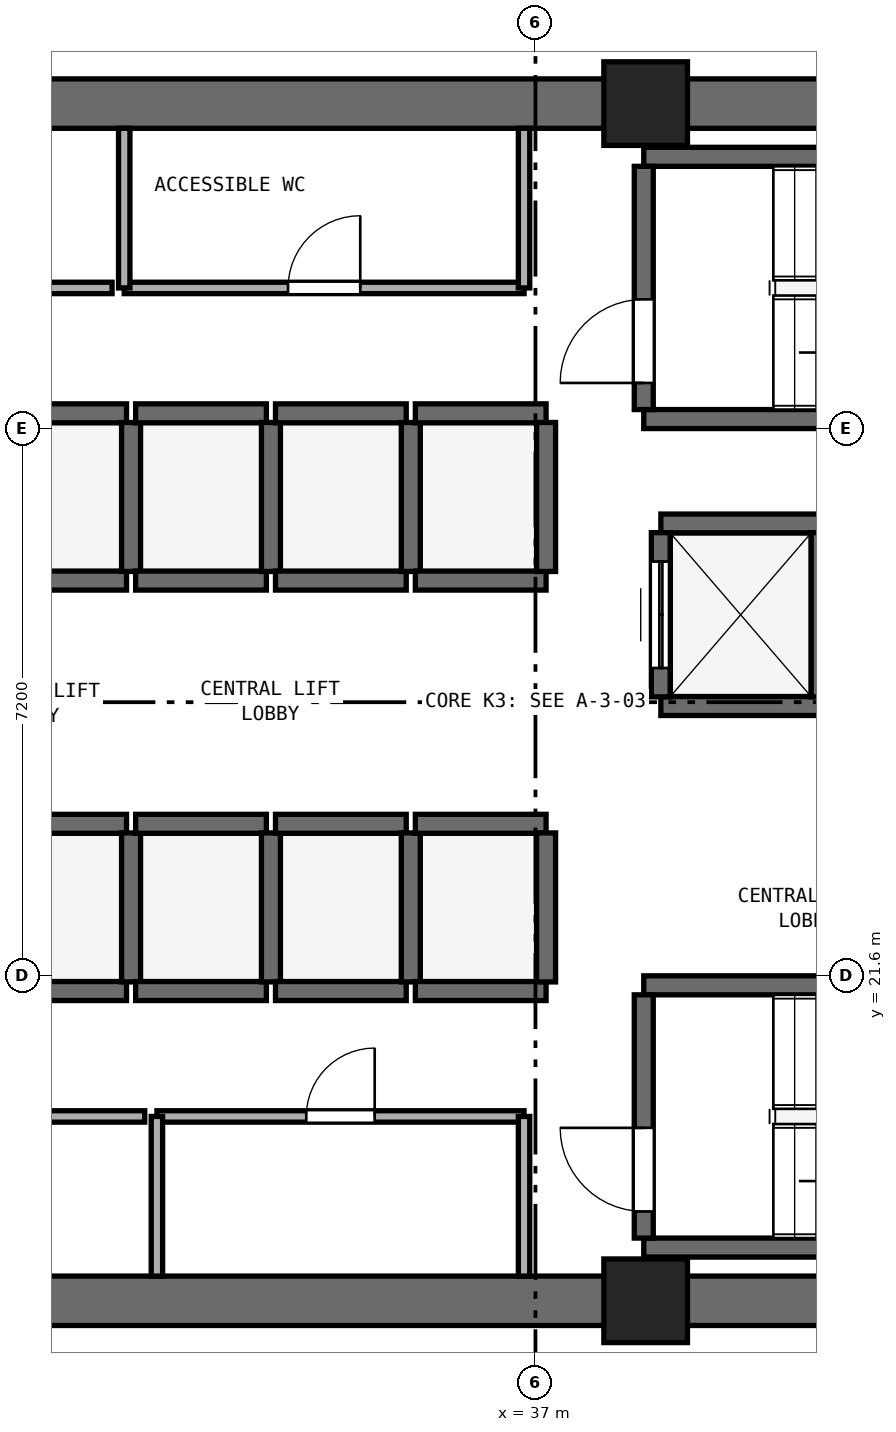
"""IFC4 building model, lengths in metres.
Left out: names, types, materials, properties, quantities, classifications, styles, units other than length and angle.
Written with IfcOpenShell. Run it as: python <this file> out.ifc"""

import sys

from ifc_helpers import new_model, si_unit, direction, frame, frame_2d, origin, origin_2d, place, context, subcontext, project, spatial, rectangle, extrude, element, fill, save


model = new_model("IFC4")
c1 = context("Model", 3, precision=1e-05, world=origin(), true_north=direction((0.0, 1.0)))
c2 = subcontext(c1, "Body", "Model", "MODEL_VIEW")
j1 = project(units=[si_unit("LENGTHUNIT", "METRE"), si_unit("PLANEANGLEUNIT", "RADIAN")], contexts=[c1])
p1 = place(None, origin())
s1 = spatial("IfcSite", under=j1, at=p1, CompositionType="ELEMENT")
p2 = place(p1, origin())
s2 = spatial("IfcBuilding", under=s1, at=p2, CompositionType="ELEMENT")
p3 = place(p2, frame((0.0, 0.0, 44.0)))
s3 = spatial("IfcBuildingStorey", under=s2, at=p3, CompositionType="ELEMENT", Elevation=44.0)
for number, where, z_axis, x_axis in (
    (1, (25.4, 17.325, 0.0), (0.0, 0.0, 1.0), (1.0, 0.0, 0.0)),
    (2, (25.4, 33.075, 0.0), (0.0, 0.0, 1.0), (1.0, 0.0, 0.0)),
):
    element("IfcWall", number, at=place(p3, frame(where, z_axis=z_axis, x_axis=x_axis)), inside=s3, PredefinedType="SHEAR", context=c2, shape_type="SweptSolid", body=[
        extrude(rectangle(XDim=23.2, YDim=0.65, at=frame_2d((11.6, 0.0))), origin(), (0.0, 0.0, 1.0), 3.525),
    ])
for number, where, z_axis, x_axis in (
    (3, (38.45, 17.325, 0.0), (0.0, 0.0, 1.0), (1.0, 0.0, 0.0)),
    (4, (38.45, 33.075, 0.0), (0.0, 0.0, 1.0), (1.0, 0.0, 0.0)),
):
    element("IfcColumn", number, at=place(p3, frame(where, z_axis=z_axis, x_axis=x_axis)), inside=s3, PredefinedType="PILASTER", context=c2, shape_type="SweptSolid", body=[
        extrude(rectangle(XDim=1.1, YDim=1.1, at=origin_2d()), origin(), (0.0, 0.0, 1.0), 3.8),
    ])
for number, where, z_axis, x_axis in (
    (5, (38.425, 28.925, 0.0), (0.0, 0.0, 1.0), (1.0, 0.0, 0.0)),
    (6, (38.425, 32.375, 0.0), (0.0, 0.0, 1.0), (1.0, 0.0, 0.0)),
):
    element("IfcWall", number, at=place(p3, frame(where, z_axis=z_axis, x_axis=x_axis)), inside=s3, PredefinedType="SHEAR", context=c2, shape_type="SweptSolid", body=[
        extrude(rectangle(XDim=7.3, YDim=0.25, at=frame_2d((3.65, 0.0))), origin(), (0.0, 0.0, 1.0), 3.525),
    ])
p4 = place(p3, frame((38.425, 29.05, 0.0), z_axis=(0.0, 0.0, 1.0), x_axis=(0.0, 1.0, 0.0)))
e7 = element("IfcWall", 7, at=p4, inside=s3, PredefinedType="SHEAR", context=c2, shape_type="SweptSolid", body=[
    extrude(rectangle(XDim=3.2, YDim=0.25, at=frame_2d((1.6, 0.0))), origin(), (0.0, 0.0, 1.0), 3.525),
])
p5 = place(p4, frame((0.35, 0.0, 0.0)))
e8 = element("IfcOpeningElement", 8, at=p5, cuts=e7, PredefinedType="OPENING", context=c2, shape_type="SweptSolid", body=[
    extrude(rectangle(XDim=1.1, YDim=2.15, at=frame_2d((0.55, 1.075))), frame((0.0, 0.135, 0.0), z_axis=(0.0, -1.0, 0.0), x_axis=(1.0, 0.0, 0.0)), (0.0, 0.0, 1.0), 0.27),
])
for number, where, z_axis, x_axis in (
    (9, (38.425, 18.025, 0.0), (0.0, 0.0, 1.0), (1.0, 0.0, 0.0)),
    (10, (38.425, 21.475, 0.0), (0.0, 0.0, 1.0), (1.0, 0.0, 0.0)),
):
    element("IfcWall", number, at=place(p3, frame(where, z_axis=z_axis, x_axis=x_axis)), inside=s3, PredefinedType="SHEAR", context=c2, shape_type="SweptSolid", body=[
        extrude(rectangle(XDim=7.3, YDim=0.25, at=frame_2d((3.65, 0.0))), origin(), (0.0, 0.0, 1.0), 3.525),
    ])
p6 = place(p3, frame((38.425, 18.15, 0.0), z_axis=(0.0, 0.0, 1.0), x_axis=(0.0, 1.0, 0.0)))
e11 = element("IfcWall", 11, at=p6, inside=s3, PredefinedType="SHEAR", context=c2, shape_type="SweptSolid", body=[
    extrude(rectangle(XDim=3.2, YDim=0.25, at=frame_2d((1.6, 0.0))), origin(), (0.0, 0.0, 1.0), 3.525),
])
p7 = place(p6, frame((0.35, 0.0, 0.0)))
e12 = element("IfcOpeningElement", 12, at=p7, cuts=e11, PredefinedType="OPENING", context=c2, shape_type="SweptSolid", body=[
    extrude(rectangle(XDim=1.1, YDim=2.15, at=frame_2d((0.55, 1.075))), frame((0.0, 0.135, 0.0), z_axis=(0.0, -1.0, 0.0), x_axis=(1.0, 0.0, 0.0)), (0.0, 0.0, 1.0), 0.27),
])
for number, where, z_axis, x_axis in (
    (13, (29.9, 21.4, 0.0), (0.0, 0.0, 1.0), (1.0, 0.0, 0.0)),
    (14, (29.9, 23.6, 0.0), (0.0, 0.0, 1.0), (1.0, 0.0, 0.0)),
):
    element("IfcWall", number, at=place(p3, frame(where, z_axis=z_axis, x_axis=x_axis)), inside=s3, PredefinedType="SHEAR", context=c2, shape_type="SweptSolid", body=[
        extrude(rectangle(XDim=1.72, YDim=0.25, at=frame_2d((0.86, 0.0))), origin(), (0.0, 0.0, 1.0), 3.525),
    ])
p8 = place(p3, frame((31.68, 21.52, 0.0), z_axis=(0.0, 0.0, 1.0), x_axis=(0.0, 1.0, 0.0)))
e15 = element("IfcWall", 15, at=p8, inside=s3, PredefinedType="SHEAR", context=c2, shape_type="SweptSolid", body=[
    extrude(rectangle(XDim=1.96, YDim=0.25, at=frame_2d((0.98, 0.0))), origin(), (0.0, 0.0, 1.0), 3.525),
])
for number, where, z_axis, x_axis in (
    (16, (31.74, 21.4, 0.0), (0.0, 0.0, 1.0), (1.0, 0.0, 0.0)),
    (17, (31.74, 23.6, 0.0), (0.0, 0.0, 1.0), (1.0, 0.0, 0.0)),
):
    element("IfcWall", number, at=place(p3, frame(where, z_axis=z_axis, x_axis=x_axis)), inside=s3, PredefinedType="SHEAR", context=c2, shape_type="SweptSolid", body=[
        extrude(rectangle(XDim=1.72, YDim=0.25, at=frame_2d((0.86, 0.0))), origin(), (0.0, 0.0, 1.0), 3.525),
    ])
p9 = place(p3, frame((33.52, 21.52, 0.0), z_axis=(0.0, 0.0, 1.0), x_axis=(0.0, 1.0, 0.0)))
e18 = element("IfcWall", 18, at=p9, inside=s3, PredefinedType="SHEAR", context=c2, shape_type="SweptSolid", body=[
    extrude(rectangle(XDim=1.96, YDim=0.25, at=frame_2d((0.98, 0.0))), origin(), (0.0, 0.0, 1.0), 3.525),
])
for number, where, z_axis, x_axis in (
    (19, (33.58, 21.4, 0.0), (0.0, 0.0, 1.0), (1.0, 0.0, 0.0)),
    (20, (33.58, 23.6, 0.0), (0.0, 0.0, 1.0), (1.0, 0.0, 0.0)),
):
    element("IfcWall", number, at=place(p3, frame(where, z_axis=z_axis, x_axis=x_axis)), inside=s3, PredefinedType="SHEAR", context=c2, shape_type="SweptSolid", body=[
        extrude(rectangle(XDim=1.72, YDim=0.25, at=frame_2d((0.86, 0.0))), origin(), (0.0, 0.0, 1.0), 3.525),
    ])
p10 = place(p3, frame((35.36, 21.52, 0.0), z_axis=(0.0, 0.0, 1.0), x_axis=(0.0, 1.0, 0.0)))
e21 = element("IfcWall", 21, at=p10, inside=s3, PredefinedType="SHEAR", context=c2, shape_type="SweptSolid", body=[
    extrude(rectangle(XDim=1.96, YDim=0.25, at=frame_2d((0.98, 0.0))), origin(), (0.0, 0.0, 1.0), 3.525),
])
for number, where, z_axis, x_axis in (
    (22, (35.42, 21.4, 0.0), (0.0, 0.0, 1.0), (1.0, 0.0, 0.0)),
    (23, (35.42, 23.6, 0.0), (0.0, 0.0, 1.0), (1.0, 0.0, 0.0)),
):
    element("IfcWall", number, at=place(p3, frame(where, z_axis=z_axis, x_axis=x_axis)), inside=s3, PredefinedType="SHEAR", context=c2, shape_type="SweptSolid", body=[
        extrude(rectangle(XDim=1.72, YDim=0.25, at=frame_2d((0.86, 0.0))), origin(), (0.0, 0.0, 1.0), 3.525),
    ])
p11 = place(p3, frame((37.14, 21.52, 0.0), z_axis=(0.0, 0.0, 1.0), x_axis=(0.0, 1.0, 0.0)))
e24 = element("IfcWall", 24, at=p11, inside=s3, PredefinedType="SHEAR", context=c2, shape_type="SweptSolid", body=[
    extrude(rectangle(XDim=1.96, YDim=0.25, at=frame_2d((0.98, 0.0))), origin(), (0.0, 0.0, 1.0), 3.525),
])
for number, where, z_axis, x_axis in (
    (25, (29.9, 26.8, 0.0), (0.0, 0.0, 1.0), (1.0, 0.0, 0.0)),
    (26, (29.9, 29.0, 0.0), (0.0, 0.0, 1.0), (1.0, 0.0, 0.0)),
):
    element("IfcWall", number, at=place(p3, frame(where, z_axis=z_axis, x_axis=x_axis)), inside=s3, PredefinedType="SHEAR", context=c2, shape_type="SweptSolid", body=[
        extrude(rectangle(XDim=1.72, YDim=0.25, at=frame_2d((0.86, 0.0))), origin(), (0.0, 0.0, 1.0), 3.525),
    ])
p12 = place(p3, frame((31.68, 26.92, 0.0), z_axis=(0.0, 0.0, 1.0), x_axis=(0.0, 1.0, 0.0)))
e27 = element("IfcWall", 27, at=p12, inside=s3, PredefinedType="SHEAR", context=c2, shape_type="SweptSolid", body=[
    extrude(rectangle(XDim=1.96, YDim=0.25, at=frame_2d((0.98, 0.0))), origin(), (0.0, 0.0, 1.0), 3.525),
])
for number, where, z_axis, x_axis in (
    (28, (31.74, 26.8, 0.0), (0.0, 0.0, 1.0), (1.0, 0.0, 0.0)),
    (29, (31.74, 29.0, 0.0), (0.0, 0.0, 1.0), (1.0, 0.0, 0.0)),
):
    element("IfcWall", number, at=place(p3, frame(where, z_axis=z_axis, x_axis=x_axis)), inside=s3, PredefinedType="SHEAR", context=c2, shape_type="SweptSolid", body=[
        extrude(rectangle(XDim=1.72, YDim=0.25, at=frame_2d((0.86, 0.0))), origin(), (0.0, 0.0, 1.0), 3.525),
    ])
p13 = place(p3, frame((33.52, 26.92, 0.0), z_axis=(0.0, 0.0, 1.0), x_axis=(0.0, 1.0, 0.0)))
e30 = element("IfcWall", 30, at=p13, inside=s3, PredefinedType="SHEAR", context=c2, shape_type="SweptSolid", body=[
    extrude(rectangle(XDim=1.96, YDim=0.25, at=frame_2d((0.98, 0.0))), origin(), (0.0, 0.0, 1.0), 3.525),
])
for number, where, z_axis, x_axis in (
    (31, (33.58, 26.8, 0.0), (0.0, 0.0, 1.0), (1.0, 0.0, 0.0)),
    (32, (33.58, 29.0, 0.0), (0.0, 0.0, 1.0), (1.0, 0.0, 0.0)),
):
    element("IfcWall", number, at=place(p3, frame(where, z_axis=z_axis, x_axis=x_axis)), inside=s3, PredefinedType="SHEAR", context=c2, shape_type="SweptSolid", body=[
        extrude(rectangle(XDim=1.72, YDim=0.25, at=frame_2d((0.86, 0.0))), origin(), (0.0, 0.0, 1.0), 3.525),
    ])
p14 = place(p3, frame((35.36, 26.92, 0.0), z_axis=(0.0, 0.0, 1.0), x_axis=(0.0, 1.0, 0.0)))
e33 = element("IfcWall", 33, at=p14, inside=s3, PredefinedType="SHEAR", context=c2, shape_type="SweptSolid", body=[
    extrude(rectangle(XDim=1.96, YDim=0.25, at=frame_2d((0.98, 0.0))), origin(), (0.0, 0.0, 1.0), 3.525),
])
for number, where, z_axis, x_axis in (
    (34, (35.42, 26.8, 0.0), (0.0, 0.0, 1.0), (1.0, 0.0, 0.0)),
    (35, (35.42, 29.0, 0.0), (0.0, 0.0, 1.0), (1.0, 0.0, 0.0)),
):
    element("IfcWall", number, at=place(p3, frame(where, z_axis=z_axis, x_axis=x_axis)), inside=s3, PredefinedType="SHEAR", context=c2, shape_type="SweptSolid", body=[
        extrude(rectangle(XDim=1.72, YDim=0.25, at=frame_2d((0.86, 0.0))), origin(), (0.0, 0.0, 1.0), 3.525),
    ])
p15 = place(p3, frame((37.14, 26.92, 0.0), z_axis=(0.0, 0.0, 1.0), x_axis=(0.0, 1.0, 0.0)))
e36 = element("IfcWall", 36, at=p15, inside=s3, PredefinedType="SHEAR", context=c2, shape_type="SweptSolid", body=[
    extrude(rectangle(XDim=1.96, YDim=0.25, at=frame_2d((0.98, 0.0))), origin(), (0.0, 0.0, 1.0), 3.525),
])
for number, where, z_axis, x_axis in (
    (37, (38.65, 25.15, 0.0), (0.0, 0.0, 1.0), (1.0, 0.0, 0.0)),
    (38, (38.65, 27.55, 0.0), (0.0, 0.0, 1.0), (1.0, 0.0, 0.0)),
):
    element("IfcWall", number, at=place(p3, frame(where, z_axis=z_axis, x_axis=x_axis)), inside=s3, PredefinedType="SHEAR", context=c2, shape_type="SweptSolid", body=[
        extrude(rectangle(XDim=2.1, YDim=0.25, at=frame_2d((1.05, 0.0))), origin(), (0.0, 0.0, 1.0), 3.525),
    ])
p16 = place(p3, frame((38.65, 25.27, 0.0), z_axis=(0.0, 0.0, 1.0), x_axis=(0.0, 1.0, 0.0)))
e39 = element("IfcWall", 39, at=p16, inside=s3, PredefinedType="SHEAR", context=c2, shape_type="SweptSolid", body=[
    extrude(rectangle(XDim=2.16, YDim=0.25, at=frame_2d((1.08, 0.0))), origin(), (0.0, 0.0, 1.0), 3.525),
])
p17 = place(p16, frame((0.38, 0.0, 0.0)))
e40 = element("IfcOpeningElement", 40, at=p17, cuts=e39, PredefinedType="OPENING", context=c2, shape_type="SweptSolid", body=[
    extrude(rectangle(XDim=1.4, YDim=2.2, at=frame_2d((0.7, 1.1))), frame((0.0, 0.135, 0.0), z_axis=(0.0, -1.0, 0.0), x_axis=(1.0, 0.0, 0.0)), (0.0, 0.0, 1.0), 0.27),
])
p18 = place(p3, frame((40.75, 25.27, 0.0), z_axis=(0.0, 0.0, 1.0), x_axis=(0.0, 1.0, 0.0)))
e41 = element("IfcWall", 41, at=p18, inside=s3, PredefinedType="SHEAR", context=c2, shape_type="SweptSolid", body=[
    extrude(rectangle(XDim=2.16, YDim=0.25, at=frame_2d((1.08, 0.0))), origin(), (0.0, 0.0, 1.0), 3.525),
])
p19 = place(p3, frame((26.17, 30.65, 0.0), z_axis=(0.0, 0.0, 1.0), x_axis=(1.0, 0.0, 0.0)))
e42 = element("IfcWall", 42, at=p19, inside=s3, PredefinedType="PARTITIONING", context=c2, shape_type="SweptSolid", body=[
    extrude(rectangle(XDim=5.26, YDim=0.15, at=frame_2d((2.63, 0.0))), origin(), (0.0, 0.0, 1.0), 3.525),
])
p20 = place(p19, frame((2.155, 0.0, 0.0)))
e43 = element("IfcOpeningElement", 43, at=p20, cuts=e42, PredefinedType="OPENING", context=c2, shape_type="SweptSolid", body=[
    extrude(rectangle(XDim=0.95, YDim=2.1, at=frame_2d((0.475, 1.05))), frame((0.0, 0.085, 0.0), z_axis=(0.0, -1.0, 0.0), x_axis=(1.0, 0.0, 0.0)), (0.0, 0.0, 1.0), 0.17),
])
p21 = place(p3, frame((31.59, 30.65, 0.0), z_axis=(0.0, 0.0, 1.0), x_axis=(1.0, 0.0, 0.0)))
e44 = element("IfcWall", 44, at=p21, inside=s3, PredefinedType="PARTITIONING", context=c2, shape_type="SweptSolid", body=[
    extrude(rectangle(XDim=5.26, YDim=0.15, at=frame_2d((2.63, 0.0))), origin(), (0.0, 0.0, 1.0), 3.525),
])
p22 = place(p21, frame((2.155, 0.0, 0.0)))
e45 = element("IfcOpeningElement", 45, at=p22, cuts=e44, PredefinedType="OPENING", context=c2, shape_type="SweptSolid", body=[
    extrude(rectangle(XDim=0.95, YDim=2.1, at=frame_2d((0.475, 1.05))), frame((0.0, 0.085, 0.0), z_axis=(0.0, -1.0, 0.0), x_axis=(1.0, 0.0, 0.0)), (0.0, 0.0, 1.0), 0.17),
])
for number, where, z_axis, x_axis in (
    (46, (31.59, 30.65, 0.0), (0.0, 0.0, 1.0), (0.0, 1.0, 0.0)),
    (47, (36.85, 30.65, 0.0), (0.0, 0.0, 1.0), (0.0, 1.0, 0.0)),
):
    element("IfcWall", number, at=place(p3, frame(where, z_axis=z_axis, x_axis=x_axis)), inside=s3, PredefinedType="PARTITIONING", context=c2, shape_type="SweptSolid", body=[
        extrude(rectangle(XDim=2.1, YDim=0.15, at=frame_2d((1.05, 0.0))), origin(), (0.0, 0.0, 1.0), 3.525),
    ])
p23 = place(p3, frame((26.17, 19.75, 0.0), z_axis=(0.0, 0.0, 1.0), x_axis=(1.0, 0.0, 0.0)))
e48 = element("IfcWall", 48, at=p23, inside=s3, PredefinedType="PARTITIONING", context=c2, shape_type="SweptSolid", body=[
    extrude(rectangle(XDim=5.69, YDim=0.15, at=frame_2d((2.845, 0.0))), origin(), (0.0, 0.0, 1.0), 3.525),
])
p24 = place(p23, frame((2.37, 0.0, 0.0)))
e49 = element("IfcOpeningElement", 49, at=p24, cuts=e48, PredefinedType="OPENING", context=c2, shape_type="SweptSolid", body=[
    extrude(rectangle(XDim=0.95, YDim=2.1, at=frame_2d((0.475, 1.05))), frame((0.0, 0.085, 0.0), z_axis=(0.0, -1.0, 0.0), x_axis=(1.0, 0.0, 0.0)), (0.0, 0.0, 1.0), 0.17),
])
p25 = place(p3, frame((32.02, 19.75, 0.0), z_axis=(0.0, 0.0, 1.0), x_axis=(1.0, 0.0, 0.0)))
e50 = element("IfcWall", 50, at=p25, inside=s3, PredefinedType="PARTITIONING", context=c2, shape_type="SweptSolid", body=[
    extrude(rectangle(XDim=4.83, YDim=0.15, at=frame_2d((2.415, 0.0))), origin(), (0.0, 0.0, 1.0), 3.525),
])
p26 = place(p25, frame((1.965, 0.0, 0.0)))
e51 = element("IfcOpeningElement", 51, at=p26, cuts=e50, PredefinedType="OPENING", context=c2, shape_type="SweptSolid", body=[
    extrude(rectangle(XDim=0.9, YDim=2.1, at=frame_2d((0.45, 1.05))), frame((0.0, 0.085, 0.0), z_axis=(0.0, -1.0, 0.0), x_axis=(1.0, 0.0, 0.0)), (0.0, 0.0, 1.0), 0.17),
])
for number, where, z_axis, x_axis in (
    (52, (32.02, 17.65, 0.0), (0.0, 0.0, 1.0), (0.0, 1.0, 0.0)),
    (53, (36.85, 17.65, 0.0), (0.0, 0.0, 1.0), (0.0, 1.0, 0.0)),
):
    element("IfcWall", number, at=place(p3, frame(where, z_axis=z_axis, x_axis=x_axis)), inside=s3, PredefinedType="PARTITIONING", context=c2, shape_type="SweptSolid", body=[
        extrude(rectangle(XDim=2.1, YDim=0.15, at=frame_2d((1.05, 0.0))), origin(), (0.0, 0.0, 1.0), 3.525),
    ])
p27 = place(p5, origin())
e54 = element("IfcDoor", 54, at=p27, inside=s3, OperationType="SINGLE_SWING_LEFT", PredefinedType="DOOR", context=c2, shape_type="SweptSolid", body=[
    extrude(rectangle(XDim=1.1, YDim=2.15, at=frame_2d((0.55, 1.075))), frame((0.0, 0.025, 0.0), z_axis=(0.0, -1.0, 0.0), x_axis=(1.0, 0.0, 0.0)), (0.0, 0.0, 1.0), 0.05),
])
fill(e8, e54)
p28 = place(p7, origin())
e55 = element("IfcDoor", 55, at=p28, inside=s3, OperationType="SINGLE_SWING_RIGHT", PredefinedType="DOOR", context=c2, shape_type="SweptSolid", body=[
    extrude(rectangle(XDim=1.1, YDim=2.15, at=frame_2d((0.55, 1.075))), frame((0.0, 0.025, 0.0), z_axis=(0.0, -1.0, 0.0), x_axis=(1.0, 0.0, 0.0)), (0.0, 0.0, 1.0), 0.05),
])
fill(e12, e55)
p29 = place(p17, origin())
e56 = element("IfcDoor", 56, at=p29, inside=s3, OperationType="DOUBLE_DOOR_SLIDING", PredefinedType="DOOR", context=c2, shape_type="SweptSolid", body=[
    extrude(rectangle(XDim=1.4, YDim=2.2, at=frame_2d((0.7, 1.1))), frame((0.0, 0.025, 0.0), z_axis=(0.0, -1.0, 0.0), x_axis=(1.0, 0.0, 0.0)), (0.0, 0.0, 1.0), 0.05),
])
fill(e40, e56)
p30 = place(p22, origin())
e57 = element("IfcDoor", 57, at=p30, inside=s3, OperationType="SINGLE_SWING_RIGHT", PredefinedType="DOOR", context=c2, shape_type="SweptSolid", body=[
    extrude(rectangle(XDim=0.95, YDim=2.1, at=frame_2d((0.475, 1.05))), frame((0.0, 0.025, 0.0), z_axis=(0.0, -1.0, 0.0), x_axis=(1.0, 0.0, 0.0)), (0.0, 0.0, 1.0), 0.05),
])
fill(e45, e57)
p31 = place(p26, origin())
e58 = element("IfcDoor", 58, at=p31, inside=s3, OperationType="SINGLE_SWING_RIGHT", PredefinedType="DOOR", context=c2, shape_type="SweptSolid", body=[
    extrude(rectangle(XDim=0.9, YDim=2.1, at=frame_2d((0.45, 1.05))), frame((0.0, 0.025, 0.0), z_axis=(0.0, -1.0, 0.0), x_axis=(1.0, 0.0, 0.0)), (0.0, 0.0, 1.0), 0.05),
])
fill(e51, e58)
save(model, sys.argv[1])
